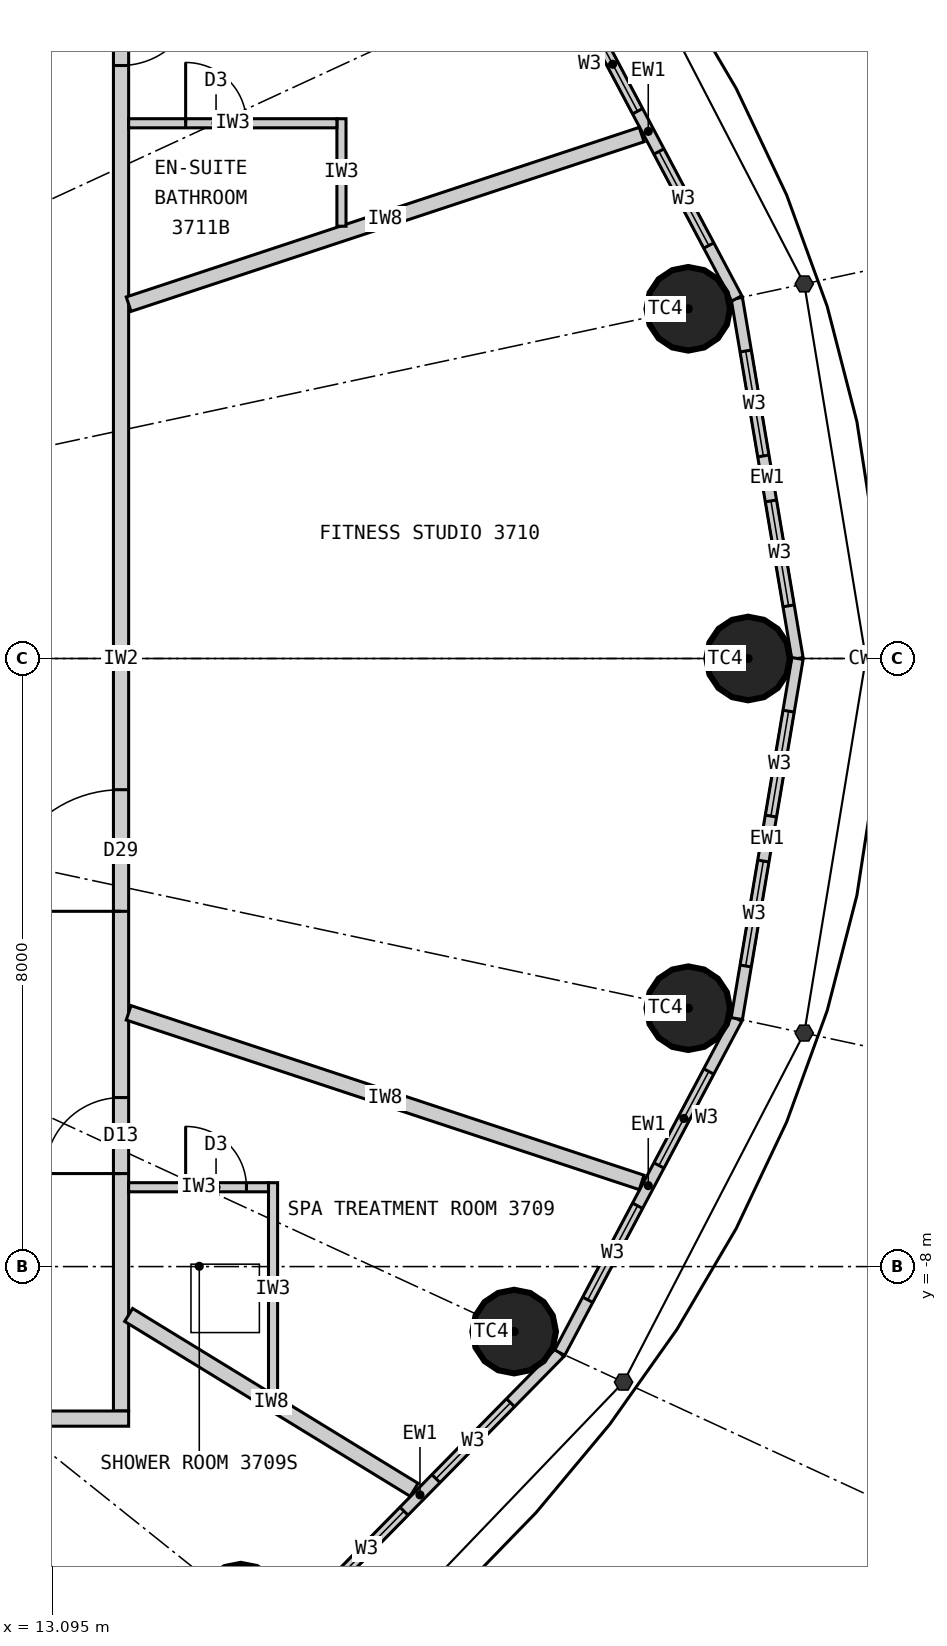
"""IFC4 building model, lengths in metres.
Left out: names, types, materials, properties, quantities, classifications, styles, units other than length and angle.
Written with IfcOpenShell. Run it as: python <this file> out.ifc"""

import sys

from ifc_helpers import new_model, si_unit, direction, frame, frame_2d, origin, origin_2d, place, context, subcontext, project, spatial, rectangle, circle, extrude, element, fill, save


model = new_model("IFC4")
c1 = context("Model", 3, precision=1e-05, world=origin(), true_north=direction((0.0, 1.0)))
c2 = subcontext(c1, "Body", "Model", "MODEL_VIEW")
j1 = project(units=[si_unit("LENGTHUNIT", "METRE"), si_unit("PLANEANGLEUNIT", "RADIAN")], contexts=[c1])
p1 = place(None, origin())
s1 = spatial("IfcSite", under=j1, at=p1, CompositionType="ELEMENT")
p2 = place(p1, origin())
s2 = spatial("IfcBuilding", under=s1, at=p2, CompositionType="ELEMENT")
p3 = place(p2, frame((0.0, 0.0, 143.4)))
s3 = spatial("IfcBuildingStorey", under=s2, at=p3, CompositionType="ELEMENT", Elevation=143.4)
for number, where, z_axis, x_axis in (
    (1, (22.25, 0.0, 0.0), (0.0, 0.0, 1.0), (1.0, 0.0, 0.0)),
    (2, (21.463, 4.601, 0.0), (0.0, 0.0, 1.0), (1.0, 0.0, 0.0)),
    (3, (15.576, -12.461, 0.0), (0.0, 0.0, 1.0), (1.0, 0.0, 0.0)),
    (4, (19.172, -8.855, 0.0), (0.0, 0.0, 1.0), (1.0, 0.0, 0.0)),
    (5, (21.463, -4.601, 0.0), (0.0, 0.0, 1.0), (1.0, 0.0, 0.0)),
):
    element("IfcColumn", number, at=place(p3, frame(where, z_axis=z_axis, x_axis=x_axis)), inside=s3, PredefinedType="COLUMN", context=c2, shape_type="SweptSolid", body=[
        extrude(circle(Radius=0.55, at=origin_2d()), origin(), (0.0, 0.0, 1.0), 3.3),
    ])
p4 = place(p3, frame((22.9, 0.0, 0.0), z_axis=(0.0, 0.0, 1.0), x_axis=(-0.166162111254, 0.986098449843, 0.0)))
e6 = element("IfcWall", 6, at=p4, inside=s3, PredefinedType="ELEMENTEDWALL", context=c2, shape_type="SweptSolid", body=[
    extrude(rectangle(XDim=4.805, YDim=0.15, at=frame_2d((2.402, 0.0))), origin(), (0.0, 0.0, 1.0), 3.12),
])
p5 = place(p4, frame((0.702, 0.0, 0.9)))
e7 = element("IfcOpeningElement", 7, at=p5, cuts=e6, PredefinedType="OPENING", context=c2, shape_type="SweptSolid", body=[
    extrude(rectangle(XDim=1.4, YDim=1.9, at=frame_2d((0.7, 0.95))), frame((0.0, 0.085, 0.0), z_axis=(0.0, -1.0, 0.0), x_axis=(1.0, 0.0, 0.0)), (0.0, 0.0, 1.0), 0.17),
])
p6 = place(p4, frame((2.702, 0.0, 0.9)))
e8 = element("IfcOpeningElement", 8, at=p6, cuts=e6, PredefinedType="OPENING", context=c2, shape_type="SweptSolid", body=[
    extrude(rectangle(XDim=1.4, YDim=1.9, at=frame_2d((0.7, 0.95))), frame((0.0, 0.085, 0.0), z_axis=(0.0, -1.0, 0.0), x_axis=(1.0, 0.0, 0.0)), (0.0, 0.0, 1.0), 0.17),
])
p7 = place(p3, frame((22.102, 4.738, 0.0), z_axis=(0.0, 0.0, 1.0), x_axis=(-0.468428906714, 0.883501193748, 0.0)))
e9 = element("IfcWall", 9, at=p7, inside=s3, PredefinedType="ELEMENTEDWALL", context=c2, shape_type="SweptSolid", body=[
    extrude(rectangle(XDim=4.974, YDim=0.15, at=frame_2d((2.487, 0.0))), origin(), (0.0, 0.0, 1.0), 3.12),
])
p8 = place(p7, frame((0.787, 0.0, 0.9)))
e10 = element("IfcOpeningElement", 10, at=p8, cuts=e9, PredefinedType="OPENING", context=c2, shape_type="SweptSolid", body=[
    extrude(rectangle(XDim=1.4, YDim=1.9, at=frame_2d((0.7, 0.95))), frame((0.0, 0.085, 0.0), z_axis=(0.0, -1.0, 0.0), x_axis=(1.0, 0.0, 0.0)), (0.0, 0.0, 1.0), 0.17),
])
p9 = place(p7, frame((2.787, 0.0, 0.9)))
e11 = element("IfcOpeningElement", 11, at=p9, cuts=e9, PredefinedType="OPENING", context=c2, shape_type="SweptSolid", body=[
    extrude(rectangle(XDim=1.4, YDim=1.9, at=frame_2d((0.7, 0.95))), frame((0.0, 0.085, 0.0), z_axis=(0.0, -1.0, 0.0), x_axis=(1.0, 0.0, 0.0)), (0.0, 0.0, 1.0), 0.17),
])
p10 = place(p3, frame((16.095, -12.876, 0.0), z_axis=(0.0, 0.0, 1.0), x_axis=(0.700727467776, 0.71342905457, 0.0)))
e12 = element("IfcWall", 12, at=p10, inside=s3, PredefinedType="ELEMENTEDWALL", context=c2, shape_type="SweptSolid", body=[
    extrude(rectangle(XDim=5.247, YDim=0.15, at=frame_2d((2.624, 0.0))), origin(), (0.0, 0.0, 1.0), 3.12),
])
p11 = place(p10, frame((0.924, 0.0, 0.9)))
e13 = element("IfcOpeningElement", 13, at=p11, cuts=e12, PredefinedType="OPENING", context=c2, shape_type="SweptSolid", body=[
    extrude(rectangle(XDim=1.4, YDim=1.9, at=frame_2d((0.7, 0.95))), frame((0.0, 0.085, 0.0), z_axis=(0.0, -1.0, 0.0), x_axis=(1.0, 0.0, 0.0)), (0.0, 0.0, 1.0), 0.17),
])
p12 = place(p10, frame((2.924, 0.0, 0.9)))
e14 = element("IfcOpeningElement", 14, at=p12, cuts=e12, PredefinedType="OPENING", context=c2, shape_type="SweptSolid", body=[
    extrude(rectangle(XDim=1.4, YDim=1.9, at=frame_2d((0.7, 0.95))), frame((0.0, 0.085, 0.0), z_axis=(0.0, -1.0, 0.0), x_axis=(1.0, 0.0, 0.0)), (0.0, 0.0, 1.0), 0.17),
])
p13 = place(p3, frame((19.772, -9.132, 0.0), z_axis=(0.0, 0.0, 1.0), x_axis=(0.468428906714, 0.883501193748, 0.0)))
e15 = element("IfcWall", 15, at=p13, inside=s3, PredefinedType="ELEMENTEDWALL", context=c2, shape_type="SweptSolid", body=[
    extrude(rectangle(XDim=4.974, YDim=0.15, at=frame_2d((2.487, 0.0))), origin(), (0.0, 0.0, 1.0), 3.12),
])
p14 = place(p13, frame((0.787, 0.0, 0.9)))
e16 = element("IfcOpeningElement", 16, at=p14, cuts=e15, PredefinedType="OPENING", context=c2, shape_type="SweptSolid", body=[
    extrude(rectangle(XDim=1.4, YDim=1.9, at=frame_2d((0.7, 0.95))), frame((0.0, 0.085, 0.0), z_axis=(0.0, -1.0, 0.0), x_axis=(1.0, 0.0, 0.0)), (0.0, 0.0, 1.0), 0.17),
])
p15 = place(p13, frame((2.787, 0.0, 0.9)))
e17 = element("IfcOpeningElement", 17, at=p15, cuts=e15, PredefinedType="OPENING", context=c2, shape_type="SweptSolid", body=[
    extrude(rectangle(XDim=1.4, YDim=1.9, at=frame_2d((0.7, 0.95))), frame((0.0, 0.085, 0.0), z_axis=(0.0, -1.0, 0.0), x_axis=(1.0, 0.0, 0.0)), (0.0, 0.0, 1.0), 0.17),
])
p16 = place(p3, frame((22.102, -4.738, 0.0), z_axis=(0.0, 0.0, 1.0), x_axis=(0.166162111254, 0.986098449843, 0.0)))
e18 = element("IfcWall", 18, at=p16, inside=s3, PredefinedType="ELEMENTEDWALL", context=c2, shape_type="SweptSolid", body=[
    extrude(rectangle(XDim=4.805, YDim=0.15, at=frame_2d((2.402, 0.0))), origin(), (0.0, 0.0, 1.0), 3.12),
])
p17 = place(p16, frame((0.702, 0.0, 0.9)))
e19 = element("IfcOpeningElement", 19, at=p17, cuts=e18, PredefinedType="OPENING", context=c2, shape_type="SweptSolid", body=[
    extrude(rectangle(XDim=1.4, YDim=1.9, at=frame_2d((0.7, 0.95))), frame((0.0, 0.085, 0.0), z_axis=(0.0, -1.0, 0.0), x_axis=(1.0, 0.0, 0.0)), (0.0, 0.0, 1.0), 0.17),
])
p18 = place(p16, frame((2.702, 0.0, 0.9)))
e20 = element("IfcOpeningElement", 20, at=p18, cuts=e18, PredefinedType="OPENING", context=c2, shape_type="SweptSolid", body=[
    extrude(rectangle(XDim=1.4, YDim=1.9, at=frame_2d((0.7, 0.95))), frame((0.0, 0.085, 0.0), z_axis=(0.0, -1.0, 0.0), x_axis=(1.0, 0.0, 0.0)), (0.0, 0.0, 1.0), 0.17),
])
p19 = place(p3, frame((14.0, -9.9, 0.0), z_axis=(0.0, 0.0, 1.0), x_axis=(0.0, 1.0, 0.0)))
e21 = element("IfcWall", 21, at=p19, inside=s3, PredefinedType="PARTITIONING", context=c2, shape_type="SweptSolid", body=[
    extrude(rectangle(XDim=19.8, YDim=0.2, at=frame_2d((9.9, 0.0))), origin(), (0.0, 0.0, 1.0), 3.12),
])
p20 = place(p19, frame((3.124, 0.0, 0.0)))
e22 = element("IfcOpeningElement", 22, at=p20, cuts=e21, PredefinedType="OPENING", context=c2, shape_type="SweptSolid", body=[
    extrude(rectangle(XDim=1.0, YDim=2.2, at=frame_2d((0.5, 1.1))), frame((0.0, 0.11, 0.0), z_axis=(0.0, -1.0, 0.0), x_axis=(1.0, 0.0, 0.0)), (0.0, 0.0, 1.0), 0.22),
])
p21 = place(p19, frame((6.574, 0.0, 0.0)))
e23 = element("IfcOpeningElement", 23, at=p21, cuts=e21, PredefinedType="OPENING", context=c2, shape_type="SweptSolid", body=[
    extrude(rectangle(XDim=1.6, YDim=2.4, at=frame_2d((0.8, 1.2))), frame((0.0, 0.11, 0.0), z_axis=(0.0, -1.0, 0.0), x_axis=(1.0, 0.0, 0.0)), (0.0, 0.0, 1.0), 0.22),
])
p22 = place(p19, frame((17.701, 0.0, 0.0)))
e24 = element("IfcOpeningElement", 24, at=p22, cuts=e21, PredefinedType="OPENING", context=c2, shape_type="SweptSolid", body=[
    extrude(rectangle(XDim=1.0, YDim=2.2, at=frame_2d((0.5, 1.1))), frame((0.0, 0.11, 0.0), z_axis=(0.0, -1.0, 0.0), x_axis=(1.0, 0.0, 0.0)), (0.0, 0.0, 1.0), 0.22),
])
p23 = place(p3, frame((14.1, -10.0, 0.0), z_axis=(0.0, 0.0, 1.0), x_axis=(-1.0, 0.0, 0.0)))
e25 = element("IfcWall", 25, at=p23, inside=s3, PredefinedType="PARTITIONING", context=c2, shape_type="SweptSolid", body=[
    extrude(rectangle(XDim=28.2, YDim=0.2, at=frame_2d((14.1, 0.0))), origin(), (0.0, 0.0, 1.0), 3.12),
])
p24 = place(p23, frame((23.045, 0.0, 0.0)))
e26 = element("IfcOpeningElement", 26, at=p24, cuts=e25, PredefinedType="OPENING", context=c2, shape_type="SweptSolid", body=[
    extrude(rectangle(XDim=1.0, YDim=2.2, at=frame_2d((0.5, 1.1))), frame((0.0, 0.11, 0.0), z_axis=(0.0, -1.0, 0.0), x_axis=(1.0, 0.0, 0.0)), (0.0, 0.0, 1.0), 0.22),
])
p25 = place(p23, frame((18.529, 0.0, 0.0)))
e27 = element("IfcOpeningElement", 27, at=p25, cuts=e25, PredefinedType="OPENING", context=c2, shape_type="SweptSolid", body=[
    extrude(rectangle(XDim=1.0, YDim=2.2, at=frame_2d((0.5, 1.1))), frame((0.0, 0.11, 0.0), z_axis=(0.0, -1.0, 0.0), x_axis=(1.0, 0.0, 0.0)), (0.0, 0.0, 1.0), 0.22),
])
p26 = place(p23, frame((13.923, 0.0, 0.0)))
e28 = element("IfcOpeningElement", 28, at=p26, cuts=e25, PredefinedType="OPENING", context=c2, shape_type="SweptSolid", body=[
    extrude(rectangle(XDim=1.0, YDim=2.2, at=frame_2d((0.5, 1.1))), frame((0.0, 0.11, 0.0), z_axis=(0.0, -1.0, 0.0), x_axis=(1.0, 0.0, 0.0)), (0.0, 0.0, 1.0), 0.22),
])
p27 = place(p23, frame((9.35, 0.0, 0.0)))
e29 = element("IfcOpeningElement", 29, at=p27, cuts=e25, PredefinedType="OPENING", context=c2, shape_type="SweptSolid", body=[
    extrude(rectangle(XDim=1.6, YDim=2.4, at=frame_2d((0.8, 1.2))), frame((0.0, 0.11, 0.0), z_axis=(0.0, -1.0, 0.0), x_axis=(1.0, 0.0, 0.0)), (0.0, 0.0, 1.0), 0.22),
])
p28 = place(p3, frame((14.1, 4.661, 0.0), z_axis=(0.0, 0.0, 1.0), x_axis=(0.949453216399, 0.313908569285, 0.0)))
e30 = element("IfcWall", 30, at=p28, inside=s3, PredefinedType="PARTITIONING", context=c2, shape_type="SweptSolid", body=[
    extrude(rectangle(XDim=7.109, YDim=0.2, at=frame_2d((3.554, 0.0))), origin(), (0.0, 0.0, 1.0), 3.12),
])
p29 = place(p3, frame((14.1, -8.636, 0.0), z_axis=(0.0, 0.0, 1.0), x_axis=(0.852731884196, -0.522348862041, 0.0)))
e31 = element("IfcWall", 31, at=p29, inside=s3, PredefinedType="PARTITIONING", context=c2, shape_type="SweptSolid", body=[
    extrude(rectangle(XDim=4.404, YDim=0.2, at=frame_2d((2.202, 0.0))), origin(), (0.0, 0.0, 1.0), 3.12),
])
p30 = place(p3, frame((14.1, -4.661, 0.0), z_axis=(0.0, 0.0, 1.0), x_axis=(0.949453216399, -0.313908569285, 0.0)))
e32 = element("IfcWall", 32, at=p30, inside=s3, PredefinedType="PARTITIONING", context=c2, shape_type="SweptSolid", body=[
    extrude(rectangle(XDim=7.109, YDim=0.2, at=frame_2d((3.554, 0.0))), origin(), (0.0, 0.0, 1.0), 3.12),
])
p31 = place(p3, frame((16.0, -9.7, 0.0), z_axis=(0.0, 0.0, 1.0), x_axis=(0.0, 1.0, 0.0)))
e33 = element("IfcWall", 33, at=p31, inside=s3, PredefinedType="PARTITIONING", context=c2, shape_type="SweptSolid", body=[
    extrude(rectangle(XDim=2.804, YDim=0.12, at=frame_2d((1.402, 0.0))), origin(), (0.0, 0.0, 1.0), 3.12),
])
p32 = place(p3, frame((14.1, -6.956, 0.0), z_axis=(0.0, 0.0, 1.0), x_axis=(1.0, 0.0, 0.0)))
e34 = element("IfcWall", 34, at=p32, inside=s3, PredefinedType="PARTITIONING", context=c2, shape_type="SweptSolid", body=[
    extrude(rectangle(XDim=1.84, YDim=0.12, at=frame_2d((0.92, 0.0))), origin(), (0.0, 0.0, 1.0), 3.12),
])
p33 = place(p32, frame((0.75, 0.0, 0.0)))
e35 = element("IfcOpeningElement", 35, at=p33, cuts=e34, PredefinedType="OPENING", context=c2, shape_type="SweptSolid", body=[
    extrude(rectangle(XDim=0.8, YDim=2.1, at=frame_2d((0.4, 1.05))), frame((0.0, 0.07, 0.0), z_axis=(0.0, -1.0, 0.0), x_axis=(1.0, 0.0, 0.0)), (0.0, 0.0, 1.0), 0.14),
])
p34 = place(p3, frame((16.9, 5.687, 0.0), z_axis=(0.0, 0.0, 1.0), x_axis=(0.0, 1.0, 0.0)))
e36 = element("IfcWall", 36, at=p34, inside=s3, PredefinedType="PARTITIONING", context=c2, shape_type="SweptSolid", body=[
    extrude(rectangle(XDim=1.414, YDim=0.12, at=frame_2d((0.707, 0.0))), origin(), (0.0, 0.0, 1.0), 3.12),
])
p35 = place(p3, frame((14.1, 7.042, 0.0), z_axis=(0.0, 0.0, 1.0), x_axis=(1.0, 0.0, 0.0)))
e37 = element("IfcWall", 37, at=p35, inside=s3, PredefinedType="PARTITIONING", context=c2, shape_type="SweptSolid", body=[
    extrude(rectangle(XDim=2.74, YDim=0.12, at=frame_2d((1.37, 0.0))), origin(), (0.0, 0.0, 1.0), 3.12),
])
p36 = place(p35, frame((0.75, 0.0, 0.0)))
e38 = element("IfcOpeningElement", 38, at=p36, cuts=e37, PredefinedType="OPENING", context=c2, shape_type="SweptSolid", body=[
    extrude(rectangle(XDim=0.8, YDim=2.1, at=frame_2d((0.4, 1.05))), frame((0.0, 0.07, 0.0), z_axis=(0.0, -1.0, 0.0), x_axis=(1.0, 0.0, 0.0)), (0.0, 0.0, 1.0), 0.14),
])
p37 = place(p5, origin())
e39 = element("IfcWindow", 39, at=p37, inside=s3, PartitioningType="SINGLE_PANEL", PredefinedType="WINDOW", context=c2, shape_type="SweptSolid", body=[
    extrude(rectangle(XDim=1.4, YDim=1.9, at=frame_2d((0.7, 0.95))), frame((0.0, 0.03, 0.0), z_axis=(0.0, -1.0, 0.0), x_axis=(1.0, 0.0, 0.0)), (0.0, 0.0, 1.0), 0.06),
])
fill(e7, e39)
p38 = place(p6, origin())
e40 = element("IfcWindow", 40, at=p38, inside=s3, PartitioningType="SINGLE_PANEL", PredefinedType="WINDOW", context=c2, shape_type="SweptSolid", body=[
    extrude(rectangle(XDim=1.4, YDim=1.9, at=frame_2d((0.7, 0.95))), frame((0.0, 0.03, 0.0), z_axis=(0.0, -1.0, 0.0), x_axis=(1.0, 0.0, 0.0)), (0.0, 0.0, 1.0), 0.06),
])
fill(e8, e40)
p39 = place(p8, origin())
e41 = element("IfcWindow", 41, at=p39, inside=s3, PartitioningType="SINGLE_PANEL", PredefinedType="WINDOW", context=c2, shape_type="SweptSolid", body=[
    extrude(rectangle(XDim=1.4, YDim=1.9, at=frame_2d((0.7, 0.95))), frame((0.0, 0.03, 0.0), z_axis=(0.0, -1.0, 0.0), x_axis=(1.0, 0.0, 0.0)), (0.0, 0.0, 1.0), 0.06),
])
fill(e10, e41)
p40 = place(p9, origin())
e42 = element("IfcWindow", 42, at=p40, inside=s3, PartitioningType="SINGLE_PANEL", PredefinedType="WINDOW", context=c2, shape_type="SweptSolid", body=[
    extrude(rectangle(XDim=1.4, YDim=1.9, at=frame_2d((0.7, 0.95))), frame((0.0, 0.03, 0.0), z_axis=(0.0, -1.0, 0.0), x_axis=(1.0, 0.0, 0.0)), (0.0, 0.0, 1.0), 0.06),
])
fill(e11, e42)
p41 = place(p11, origin())
e43 = element("IfcWindow", 43, at=p41, inside=s3, PartitioningType="SINGLE_PANEL", PredefinedType="WINDOW", context=c2, shape_type="SweptSolid", body=[
    extrude(rectangle(XDim=1.4, YDim=1.9, at=frame_2d((0.7, 0.95))), frame((0.0, 0.03, 0.0), z_axis=(0.0, -1.0, 0.0), x_axis=(1.0, 0.0, 0.0)), (0.0, 0.0, 1.0), 0.06),
])
fill(e13, e43)
p42 = place(p12, origin())
e44 = element("IfcWindow", 44, at=p42, inside=s3, PartitioningType="SINGLE_PANEL", PredefinedType="WINDOW", context=c2, shape_type="SweptSolid", body=[
    extrude(rectangle(XDim=1.4, YDim=1.9, at=frame_2d((0.7, 0.95))), frame((0.0, 0.03, 0.0), z_axis=(0.0, -1.0, 0.0), x_axis=(1.0, 0.0, 0.0)), (0.0, 0.0, 1.0), 0.06),
])
fill(e14, e44)
p43 = place(p14, origin())
e45 = element("IfcWindow", 45, at=p43, inside=s3, PartitioningType="SINGLE_PANEL", PredefinedType="WINDOW", context=c2, shape_type="SweptSolid", body=[
    extrude(rectangle(XDim=1.4, YDim=1.9, at=frame_2d((0.7, 0.95))), frame((0.0, 0.03, 0.0), z_axis=(0.0, -1.0, 0.0), x_axis=(1.0, 0.0, 0.0)), (0.0, 0.0, 1.0), 0.06),
])
fill(e16, e45)
p44 = place(p15, origin())
e46 = element("IfcWindow", 46, at=p44, inside=s3, PartitioningType="SINGLE_PANEL", PredefinedType="WINDOW", context=c2, shape_type="SweptSolid", body=[
    extrude(rectangle(XDim=1.4, YDim=1.9, at=frame_2d((0.7, 0.95))), frame((0.0, 0.03, 0.0), z_axis=(0.0, -1.0, 0.0), x_axis=(1.0, 0.0, 0.0)), (0.0, 0.0, 1.0), 0.06),
])
fill(e17, e46)
p45 = place(p17, origin())
e47 = element("IfcWindow", 47, at=p45, inside=s3, PartitioningType="SINGLE_PANEL", PredefinedType="WINDOW", context=c2, shape_type="SweptSolid", body=[
    extrude(rectangle(XDim=1.4, YDim=1.9, at=frame_2d((0.7, 0.95))), frame((0.0, 0.03, 0.0), z_axis=(0.0, -1.0, 0.0), x_axis=(1.0, 0.0, 0.0)), (0.0, 0.0, 1.0), 0.06),
])
fill(e19, e47)
p46 = place(p18, origin())
e48 = element("IfcWindow", 48, at=p46, inside=s3, PartitioningType="SINGLE_PANEL", PredefinedType="WINDOW", context=c2, shape_type="SweptSolid", body=[
    extrude(rectangle(XDim=1.4, YDim=1.9, at=frame_2d((0.7, 0.95))), frame((0.0, 0.03, 0.0), z_axis=(0.0, -1.0, 0.0), x_axis=(1.0, 0.0, 0.0)), (0.0, 0.0, 1.0), 0.06),
])
fill(e20, e48)
p47 = place(p33, origin())
e49 = element("IfcDoor", 49, at=p47, inside=s3, OperationType="SINGLE_SWING_LEFT", PredefinedType="DOOR", context=c2, shape_type="SweptSolid", body=[
    extrude(rectangle(XDim=0.8, YDim=2.1, at=frame_2d((0.4, 1.05))), frame((0.0, 0.025, 0.0), z_axis=(0.0, -1.0, 0.0), x_axis=(1.0, 0.0, 0.0)), (0.0, 0.0, 1.0), 0.05),
])
fill(e35, e49)
p48 = place(p20, origin())
e50 = element("IfcDoor", 50, at=p48, inside=s3, OperationType="SINGLE_SWING_LEFT", PredefinedType="DOOR", context=c2, shape_type="SweptSolid", body=[
    extrude(rectangle(XDim=1.0, YDim=2.2, at=frame_2d((0.5, 1.1))), frame((0.0, 0.025, 0.0), z_axis=(0.0, -1.0, 0.0), x_axis=(1.0, 0.0, 0.0)), (0.0, 0.0, 1.0), 0.05),
])
fill(e22, e50)
p49 = place(p21, origin())
e51 = element("IfcDoor", 51, at=p49, inside=s3, OperationType="DOUBLE_DOOR_DOUBLE_SWING", PredefinedType="DOOR", context=c2, shape_type="SweptSolid", body=[
    extrude(rectangle(XDim=1.6, YDim=2.4, at=frame_2d((0.8, 1.2))), frame((0.0, 0.025, 0.0), z_axis=(0.0, -1.0, 0.0), x_axis=(1.0, 0.0, 0.0)), (0.0, 0.0, 1.0), 0.05),
])
fill(e23, e51)
p50 = place(p36, origin())
e52 = element("IfcDoor", 52, at=p50, inside=s3, OperationType="SINGLE_SWING_LEFT", PredefinedType="DOOR", context=c2, shape_type="SweptSolid", body=[
    extrude(rectangle(XDim=0.8, YDim=2.1, at=frame_2d((0.4, 1.05))), frame((0.0, 0.025, 0.0), z_axis=(0.0, -1.0, 0.0), x_axis=(1.0, 0.0, 0.0)), (0.0, 0.0, 1.0), 0.05),
])
fill(e38, e52)
p51 = place(p22, origin())
e53 = element("IfcDoor", 53, at=p51, inside=s3, OperationType="SINGLE_SWING_RIGHT", PredefinedType="DOOR", context=c2, shape_type="SweptSolid", body=[
    extrude(rectangle(XDim=1.0, YDim=2.2, at=frame_2d((0.5, 1.1))), frame((0.0, 0.025, 0.0), z_axis=(0.0, -1.0, 0.0), x_axis=(1.0, 0.0, 0.0)), (0.0, 0.0, 1.0), 0.05),
])
fill(e24, e53)
save(model, sys.argv[1])
